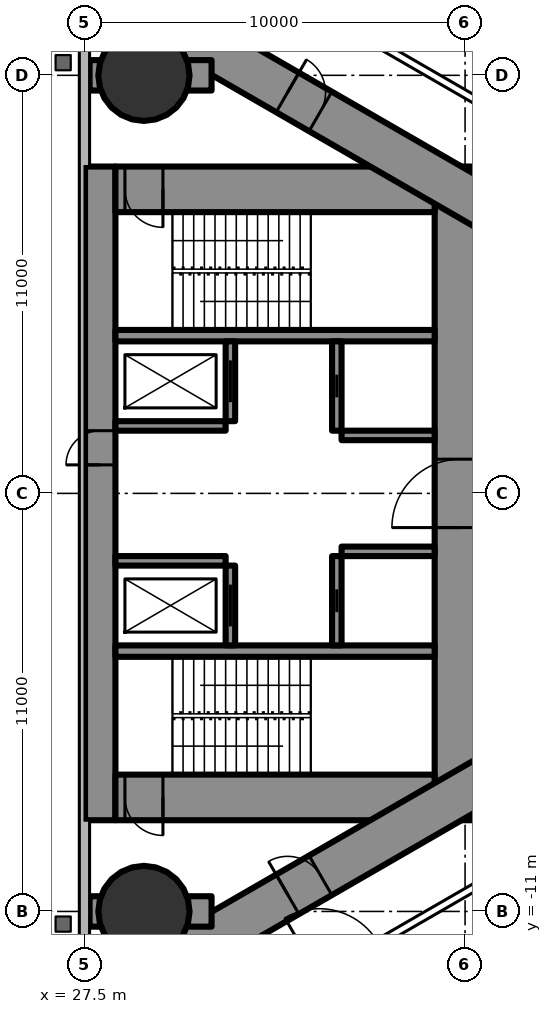
"""IFC4 building model, lengths in metres.
Left out: names, types, materials, properties, quantities, classifications, styles, units other than length and angle.
Written with IfcOpenShell. Run it as: python <this file> out.ifc"""

import sys

from ifc_helpers import new_model, si_unit, direction, frame, frame_2d, origin, origin_2d, place, context, subcontext, project, spatial, rectangle, hollow_circle, extrude, element, fill, save


model = new_model("IFC4")
c1 = context("Model", 3, precision=1e-05, world=origin(), true_north=direction((0.0, 1.0)))
c2 = subcontext(c1, "Body", "Model", "MODEL_VIEW")
j1 = project(units=[si_unit("LENGTHUNIT", "METRE"), si_unit("PLANEANGLEUNIT", "RADIAN")], contexts=[c1])
p1 = place(None, origin())
s1 = spatial("IfcSite", under=j1, at=p1, CompositionType="ELEMENT")
p2 = place(p1, origin())
s2 = spatial("IfcBuilding", under=s1, at=p2, CompositionType="ELEMENT")
p3 = place(p2, frame((0.0, 0.0, 205.3)))
s3 = spatial("IfcBuildingStorey", under=s2, at=p3, CompositionType="ELEMENT", Elevation=205.3)
for number, where, z_axis, x_axis in (
    (1, (29.05, 11.0, 0.0), (0.0, 0.0, 1.0), (1.0, 0.0, 0.0)),
    (2, (29.05, -11.0, 0.0), (0.0, 0.0, 1.0), (1.0, 0.0, 0.0)),
):
    element("IfcColumn", number, at=place(p3, frame(where, z_axis=z_axis, x_axis=x_axis)), inside=s3, PredefinedType="COLUMN", context=c2, shape_type="SweptSolid", body=[
        extrude(hollow_circle(Radius=1.2, WallThickness=0.09, at=origin_2d()), origin(), (0.0, 0.0, 1.0), 5.0),
    ])
p4 = place(p3, frame((27.9, -8.6, 0.0), z_axis=(0.0, 0.0, 1.0), x_axis=(0.0, 1.0, 0.0)))
e3 = element("IfcWall", 3, at=p4, inside=s3, PredefinedType="SHEAR", context=c2, shape_type="SweptSolid", body=[
    extrude(rectangle(XDim=17.2, YDim=0.8, at=frame_2d((8.6, 0.0))), origin(), (0.0, 0.0, 1.0), 5.0),
])
p5 = place(p4, frame((9.35, 0.0, 0.0)))
e4 = element("IfcOpeningElement", 4, at=p5, cuts=e3, PredefinedType="OPENING", context=c2, shape_type="SweptSolid", body=[
    extrude(rectangle(XDim=0.9, YDim=2.2, at=frame_2d((0.45, 1.1))), frame((0.0, 0.41, 0.0), z_axis=(0.0, -1.0, 0.0), x_axis=(1.0, 0.0, 0.0)), (0.0, 0.0, 1.0), 0.82),
])
p6 = place(p3, frame((37.375, -8.6, 0.0), z_axis=(0.0, 0.0, 1.0), x_axis=(0.0, 1.0, 0.0)))
e5 = element("IfcWall", 5, at=p6, inside=s3, PredefinedType="SHEAR", context=c2, shape_type="SweptSolid", body=[
    extrude(rectangle(XDim=17.2, YDim=1.35, at=frame_2d((8.6, 0.0))), origin(), (0.0, 0.0, 1.0), 5.0),
])
p7 = place(p6, frame((7.7, 0.0, 0.0)))
e6 = element("IfcOpeningElement", 6, at=p7, cuts=e5, PredefinedType="OPENING", context=c2, shape_type="SweptSolid", body=[
    extrude(rectangle(XDim=1.8, YDim=2.2, at=frame_2d((0.9, 1.1))), frame((0.0, 0.685, 0.0), z_axis=(0.0, -1.0, 0.0), x_axis=(1.0, 0.0, 0.0)), (0.0, 0.0, 1.0), 1.37),
])
p8 = place(p3, frame((28.3, -8.0, 0.0), z_axis=(0.0, 0.0, 1.0), x_axis=(1.0, 0.0, 0.0)))
e7 = element("IfcWall", 7, at=p8, inside=s3, PredefinedType="SHEAR", context=c2, shape_type="SweptSolid", body=[
    extrude(rectangle(XDim=8.4, YDim=1.2, at=frame_2d((4.2, 0.0))), origin(), (0.0, 0.0, 1.0), 5.0),
])
p9 = place(p8, frame((0.25, 0.0, 0.0)))
e8 = element("IfcOpeningElement", 8, at=p9, cuts=e7, PredefinedType="OPENING", context=c2, shape_type="SweptSolid", body=[
    extrude(rectangle(XDim=1.0, YDim=2.2, at=frame_2d((0.5, 1.1))), frame((0.0, 0.61, 0.0), z_axis=(0.0, -1.0, 0.0), x_axis=(1.0, 0.0, 0.0)), (0.0, 0.0, 1.0), 1.22),
])
p10 = place(p3, frame((28.3, 8.0, 0.0), z_axis=(0.0, 0.0, 1.0), x_axis=(1.0, 0.0, 0.0)))
e9 = element("IfcWall", 9, at=p10, inside=s3, PredefinedType="SHEAR", context=c2, shape_type="SweptSolid", body=[
    extrude(rectangle(XDim=8.4, YDim=1.2, at=frame_2d((4.2, 0.0))), origin(), (0.0, 0.0, 1.0), 5.0),
])
p11 = place(p10, frame((0.25, 0.0, 0.0)))
e10 = element("IfcOpeningElement", 10, at=p11, cuts=e9, PredefinedType="OPENING", context=c2, shape_type="SweptSolid", body=[
    extrude(rectangle(XDim=1.0, YDim=2.2, at=frame_2d((0.5, 1.1))), frame((0.0, 0.61, 0.0), z_axis=(0.0, -1.0, 0.0), x_axis=(1.0, 0.0, 0.0)), (0.0, 0.0, 1.0), 1.22),
])
for number, where, z_axis, x_axis in (
    (11, (28.3, -4.15, 0.0), (0.0, 0.0, 1.0), (1.0, 0.0, 0.0)),
    (12, (28.3, 4.15, 0.0), (0.0, 0.0, 1.0), (1.0, 0.0, 0.0)),
):
    element("IfcWall", number, at=place(p3, frame(where, z_axis=z_axis, x_axis=x_axis)), inside=s3, PredefinedType="SHEAR", context=c2, shape_type="SweptSolid", body=[
        extrude(rectangle(XDim=8.4, YDim=0.3, at=frame_2d((4.2, 0.0))), origin(), (0.0, 0.0, 1.0), 5.0),
    ])
p12 = place(p3, frame((31.325, -4.0, 0.0), z_axis=(0.0, 0.0, 1.0), x_axis=(0.0, 1.0, 0.0)))
e13 = element("IfcWall", 13, at=p12, inside=s3, PredefinedType="SHEAR", context=c2, shape_type="SweptSolid", body=[
    extrude(rectangle(XDim=2.1, YDim=0.25, at=frame_2d((1.05, 0.0))), origin(), (0.0, 0.0, 1.0), 5.0),
])
p13 = place(p12, frame((0.5, 0.0, 0.0)))
e14 = element("IfcOpeningElement", 14, at=p13, cuts=e13, PredefinedType="OPENING", context=c2, shape_type="SweptSolid", body=[
    extrude(rectangle(XDim=1.1, YDim=2.2, at=frame_2d((0.55, 1.1))), frame((0.0, 0.135, 0.0), z_axis=(0.0, -1.0, 0.0), x_axis=(1.0, 0.0, 0.0)), (0.0, 0.0, 1.0), 0.27),
])
p14 = place(p3, frame((34.125, -4.0, 0.0), z_axis=(0.0, 0.0, 1.0), x_axis=(0.0, 1.0, 0.0)))
e15 = element("IfcWall", 15, at=p14, inside=s3, PredefinedType="SHEAR", context=c2, shape_type="SweptSolid", body=[
    extrude(rectangle(XDim=2.35, YDim=0.25, at=frame_2d((1.175, 0.0))), origin(), (0.0, 0.0, 1.0), 5.0),
])
p15 = place(p14, frame((0.875, 0.0, 0.0)))
e16 = element("IfcOpeningElement", 16, at=p15, cuts=e15, PredefinedType="OPENING", context=c2, shape_type="SweptSolid", body=[
    extrude(rectangle(XDim=0.6, YDim=2.0, at=frame_2d((0.3, 1.0))), frame((0.0, 0.135, 0.0), z_axis=(0.0, -1.0, 0.0), x_axis=(1.0, 0.0, 0.0)), (0.0, 0.0, 1.0), 0.27),
])
p16 = place(p3, frame((28.3, -1.775, 0.0), z_axis=(0.0, 0.0, 1.0), x_axis=(1.0, 0.0, 0.0)))
e17 = element("IfcWall", 17, at=p16, inside=s3, PredefinedType="SHEAR", context=c2, shape_type="SweptSolid", body=[
    extrude(rectangle(XDim=2.9, YDim=0.25, at=frame_2d((1.45, 0.0))), origin(), (0.0, 0.0, 1.0), 5.0),
])
p17 = place(p3, frame((34.25, -1.525, 0.0), z_axis=(0.0, 0.0, 1.0), x_axis=(1.0, 0.0, 0.0)))
e18 = element("IfcWall", 18, at=p17, inside=s3, PredefinedType="SHEAR", context=c2, shape_type="SweptSolid", body=[
    extrude(rectangle(XDim=2.45, YDim=0.25, at=frame_2d((1.225, 0.0))), origin(), (0.0, 0.0, 1.0), 5.0),
])
p18 = place(p3, frame((31.325, 1.9, 0.0), z_axis=(0.0, 0.0, 1.0), x_axis=(0.0, 1.0, 0.0)))
e19 = element("IfcWall", 19, at=p18, inside=s3, PredefinedType="SHEAR", context=c2, shape_type="SweptSolid", body=[
    extrude(rectangle(XDim=2.1, YDim=0.25, at=frame_2d((1.05, 0.0))), origin(), (0.0, 0.0, 1.0), 5.0),
])
p19 = place(p18, frame((0.5, 0.0, 0.0)))
e20 = element("IfcOpeningElement", 20, at=p19, cuts=e19, PredefinedType="OPENING", context=c2, shape_type="SweptSolid", body=[
    extrude(rectangle(XDim=1.1, YDim=2.2, at=frame_2d((0.55, 1.1))), frame((0.0, 0.135, 0.0), z_axis=(0.0, -1.0, 0.0), x_axis=(1.0, 0.0, 0.0)), (0.0, 0.0, 1.0), 0.27),
])
p20 = place(p3, frame((34.125, 1.65, 0.0), z_axis=(0.0, 0.0, 1.0), x_axis=(0.0, 1.0, 0.0)))
e21 = element("IfcWall", 21, at=p20, inside=s3, PredefinedType="SHEAR", context=c2, shape_type="SweptSolid", body=[
    extrude(rectangle(XDim=2.35, YDim=0.25, at=frame_2d((1.175, 0.0))), origin(), (0.0, 0.0, 1.0), 5.0),
])
p21 = place(p20, frame((0.875, 0.0, 0.0)))
e22 = element("IfcOpeningElement", 22, at=p21, cuts=e21, PredefinedType="OPENING", context=c2, shape_type="SweptSolid", body=[
    extrude(rectangle(XDim=0.6, YDim=2.0, at=frame_2d((0.3, 1.0))), frame((0.0, 0.135, 0.0), z_axis=(0.0, -1.0, 0.0), x_axis=(1.0, 0.0, 0.0)), (0.0, 0.0, 1.0), 0.27),
])
p22 = place(p3, frame((28.3, 1.775, 0.0), z_axis=(0.0, 0.0, 1.0), x_axis=(1.0, 0.0, 0.0)))
e23 = element("IfcWall", 23, at=p22, inside=s3, PredefinedType="SHEAR", context=c2, shape_type="SweptSolid", body=[
    extrude(rectangle(XDim=2.9, YDim=0.25, at=frame_2d((1.45, 0.0))), origin(), (0.0, 0.0, 1.0), 5.0),
])
p23 = place(p3, frame((34.25, 1.525, 0.0), z_axis=(0.0, 0.0, 1.0), x_axis=(1.0, 0.0, 0.0)))
e24 = element("IfcWall", 24, at=p23, inside=s3, PredefinedType="SHEAR", context=c2, shape_type="SweptSolid", body=[
    extrude(rectangle(XDim=2.45, YDim=0.25, at=frame_2d((1.225, 0.0))), origin(), (0.0, 0.0, 1.0), 5.0),
])
p24 = place(p3, frame((27.2, -13.8, 0.0), z_axis=(0.0, 0.0, 1.0), x_axis=(0.866027159892, 0.499996958321, 0.0)))
e25 = element("IfcWall", 25, at=p24, inside=s3, PredefinedType="SHEAR", context=c2, shape_type="SweptSolid", body=[
    extrude(rectangle(XDim=27.947, YDim=1.2, at=frame_2d((13.973, 0.0))), origin(), (0.0, 0.0, 1.0), 5.0),
])
p25 = place(p24, frame((6.5, 0.0, 0.0)))
e26 = element("IfcOpeningElement", 26, at=p25, cuts=e25, PredefinedType="OPENING", context=c2, shape_type="SweptSolid", body=[
    extrude(rectangle(XDim=1.0, YDim=2.2, at=frame_2d((0.5, 1.1))), frame((0.0, 0.61, 0.0), z_axis=(0.0, -1.0, 0.0), x_axis=(1.0, 0.0, 0.0)), (0.0, 0.0, 1.0), 1.22),
])
p26 = place(p24, frame((13.568, 0.0, 0.0)))
e27 = element("IfcOpeningElement", 27, at=p26, cuts=e25, PredefinedType="OPENING", context=c2, shape_type="SweptSolid", body=[
    extrude(rectangle(XDim=1.8, YDim=2.2, at=frame_2d((0.9, 1.1))), frame((0.0, 0.61, 0.0), z_axis=(0.0, -1.0, 0.0), x_axis=(1.0, 0.0, 0.0)), (0.0, 0.0, 1.0), 1.22),
])
p27 = place(p3, frame((27.2, 13.8, 0.0), z_axis=(0.0, 0.0, 1.0), x_axis=(0.866024515034, -0.500001539357, 0.0)))
e28 = element("IfcWall", 28, at=p27, inside=s3, PredefinedType="SHEAR", context=c2, shape_type="SweptSolid", body=[
    extrude(rectangle(XDim=26.907, YDim=1.2, at=frame_2d((13.454, 0.0))), origin(), (0.0, 0.0, 1.0), 5.0),
])
p28 = place(p27, frame((6.5, 0.0, 0.0)))
e29 = element("IfcOpeningElement", 29, at=p28, cuts=e28, PredefinedType="OPENING", context=c2, shape_type="SweptSolid", body=[
    extrude(rectangle(XDim=1.0, YDim=2.2, at=frame_2d((0.5, 1.1))), frame((0.0, 0.61, 0.0), z_axis=(0.0, -1.0, 0.0), x_axis=(1.0, 0.0, 0.0)), (0.0, 0.0, 1.0), 1.22),
])
p29 = place(p27, frame((13.568, 0.0, 0.0)))
e30 = element("IfcOpeningElement", 30, at=p29, cuts=e28, PredefinedType="OPENING", context=c2, shape_type="SweptSolid", body=[
    extrude(rectangle(XDim=1.8, YDim=2.2, at=frame_2d((0.9, 1.1))), frame((0.0, 0.61, 0.0), z_axis=(0.0, -1.0, 0.0), x_axis=(1.0, 0.0, 0.0)), (0.0, 0.0, 1.0), 1.22),
])
for number, where, z_axis, x_axis in (
    (31, (27.62, -11.0, 0.0), (0.0, 0.0, 1.0), (1.0, 0.0, 0.0)),
    (32, (27.62, 11.0, 0.0), (0.0, 0.0, 1.0), (1.0, 0.0, 0.0)),
):
    element("IfcWall", number, at=place(p3, frame(where, z_axis=z_axis, x_axis=x_axis)), inside=s3, PredefinedType="SHEAR", context=c2, shape_type="SweptSolid", body=[
        extrude(rectangle(XDim=3.209, YDim=0.8, at=frame_2d((1.605, 0.0))), origin(), (0.0, 0.0, 1.0), 5.0),
    ])
p30 = place(p3, frame((27.959, 16.017, 0.0), z_axis=(0.0, 0.0, 1.0), x_axis=(0.866027146794, -0.499996981007, 0.0)))
e33 = element("IfcWall", 33, at=p30, inside=s3, PredefinedType="PARTITIONING", context=c2, shape_type="SweptSolid", body=[
    extrude(rectangle(XDim=21.657, YDim=0.2, at=frame_2d((10.829, 0.0))), origin(), (0.0, 0.0, 1.0), 4.75),
])
p31 = place(p30, frame((15.57, 0.0, 0.0)))
e34 = element("IfcOpeningElement", 34, at=p31, cuts=e33, PredefinedType="OPENING", context=c2, shape_type="SweptSolid", body=[
    extrude(rectangle(XDim=1.8, YDim=2.2, at=frame_2d((0.9, 1.1))), frame((0.0, 0.11, 0.0), z_axis=(0.0, -1.0, 0.0), x_axis=(1.0, 0.0, 0.0)), (0.0, 0.0, 1.0), 0.22),
])
p32 = place(p30, frame((6.579, 0.0, 0.0)))
e35 = element("IfcOpeningElement", 35, at=p32, cuts=e33, PredefinedType="OPENING", context=c2, shape_type="SweptSolid", body=[
    extrude(rectangle(XDim=1.8, YDim=2.2, at=frame_2d((0.9, 1.1))), frame((0.0, 0.11, 0.0), z_axis=(0.0, -1.0, 0.0), x_axis=(1.0, 0.0, 0.0)), (0.0, 0.0, 1.0), 0.22),
])
p33 = place(p3, frame((27.959, -16.017, 0.0), z_axis=(0.0, 0.0, 1.0), x_axis=(0.866026253963, 0.499998527445, 0.0)))
e36 = element("IfcWall", 36, at=p33, inside=s3, PredefinedType="PARTITIONING", context=c2, shape_type="SweptSolid", body=[
    extrude(rectangle(XDim=24.241, YDim=0.2, at=frame_2d((12.12, 0.0))), origin(), (0.0, 0.0, 1.0), 4.75),
])
p34 = place(p33, frame((6.579, 0.0, 0.0)))
e37 = element("IfcOpeningElement", 37, at=p34, cuts=e36, PredefinedType="OPENING", context=c2, shape_type="SweptSolid", body=[
    extrude(rectangle(XDim=1.8, YDim=2.2, at=frame_2d((0.9, 1.1))), frame((0.0, 0.11, 0.0), z_axis=(0.0, -1.0, 0.0), x_axis=(1.0, 0.0, 0.0)), (0.0, 0.0, 1.0), 0.22),
])
p35 = place(p33, frame((17.612, 0.0, 0.0)))
e38 = element("IfcOpeningElement", 38, at=p35, cuts=e36, PredefinedType="OPENING", context=c2, shape_type="SweptSolid", body=[
    extrude(rectangle(XDim=2.0, YDim=2.4, at=frame_2d((1.0, 1.2))), frame((0.0, 0.11, 0.0), z_axis=(0.0, -1.0, 0.0), x_axis=(1.0, 0.0, 0.0)), (0.0, 0.0, 1.0), 0.22),
])
p36 = place(p25, origin())
e39 = element("IfcDoor", 39, at=p36, inside=s3, OperationType="SINGLE_SWING_LEFT", PredefinedType="DOOR", context=c2, shape_type="SweptSolid", body=[
    extrude(rectangle(XDim=1.0, YDim=2.2, at=frame_2d((0.5, 1.1))), frame((0.0, 0.025, 0.0), z_axis=(0.0, -1.0, 0.0), x_axis=(1.0, 0.0, 0.0)), (0.0, 0.0, 1.0), 0.05),
])
fill(e26, e39)
p37 = place(p28, origin())
e40 = element("IfcDoor", 40, at=p37, inside=s3, OperationType="SINGLE_SWING_LEFT", PredefinedType="DOOR", context=c2, shape_type="SweptSolid", body=[
    extrude(rectangle(XDim=1.0, YDim=2.2, at=frame_2d((0.5, 1.1))), frame((0.0, 0.025, 0.0), z_axis=(0.0, -1.0, 0.0), x_axis=(1.0, 0.0, 0.0)), (0.0, 0.0, 1.0), 0.05),
])
fill(e29, e40)
p38 = place(p7, origin())
e41 = element("IfcDoor", 41, at=p38, inside=s3, OperationType="DOUBLE_DOOR_SINGLE_SWING", PredefinedType="DOOR", context=c2, shape_type="SweptSolid", body=[
    extrude(rectangle(XDim=1.8, YDim=2.2, at=frame_2d((0.9, 1.1))), frame((0.0, 0.025, 0.0), z_axis=(0.0, -1.0, 0.0), x_axis=(1.0, 0.0, 0.0)), (0.0, 0.0, 1.0), 0.05),
])
fill(e6, e41)
p39 = place(p9, origin())
e42 = element("IfcDoor", 42, at=p39, inside=s3, OperationType="SINGLE_SWING_RIGHT", PredefinedType="DOOR", context=c2, shape_type="SweptSolid", body=[
    extrude(rectangle(XDim=1.0, YDim=2.2, at=frame_2d((0.5, 1.1))), frame((0.0, 0.025, 0.0), z_axis=(0.0, -1.0, 0.0), x_axis=(1.0, 0.0, 0.0)), (0.0, 0.0, 1.0), 0.05),
])
fill(e8, e42)
p40 = place(p11, origin())
e43 = element("IfcDoor", 43, at=p40, inside=s3, OperationType="SINGLE_SWING_RIGHT", PredefinedType="DOOR", context=c2, shape_type="SweptSolid", body=[
    extrude(rectangle(XDim=1.0, YDim=2.2, at=frame_2d((0.5, 1.1))), frame((0.0, 0.025, 0.0), z_axis=(0.0, -1.0, 0.0), x_axis=(1.0, 0.0, 0.0)), (0.0, 0.0, 1.0), 0.05),
])
fill(e10, e43)
p41 = place(p5, origin())
e44 = element("IfcDoor", 44, at=p41, inside=s3, OperationType="SINGLE_SWING_LEFT", PredefinedType="DOOR", context=c2, shape_type="SweptSolid", body=[
    extrude(rectangle(XDim=0.9, YDim=2.2, at=frame_2d((0.45, 1.1))), frame((0.0, 0.025, 0.0), z_axis=(0.0, -1.0, 0.0), x_axis=(1.0, 0.0, 0.0)), (0.0, 0.0, 1.0), 0.05),
])
fill(e4, e44)
p42 = place(p13, origin())
e45 = element("IfcDoor", 45, at=p42, inside=s3, OperationType="SLIDING_TO_LEFT", PredefinedType="USERDEFINED", context=c2, shape_type="SweptSolid", body=[
    extrude(rectangle(XDim=1.1, YDim=2.2, at=frame_2d((0.55, 1.1))), frame((0.0, 0.025, 0.0), z_axis=(0.0, -1.0, 0.0), x_axis=(1.0, 0.0, 0.0)), (0.0, 0.0, 1.0), 0.05),
])
fill(e14, e45)
p43 = place(p19, origin())
e46 = element("IfcDoor", 46, at=p43, inside=s3, OperationType="SLIDING_TO_LEFT", PredefinedType="USERDEFINED", context=c2, shape_type="SweptSolid", body=[
    extrude(rectangle(XDim=1.1, YDim=2.2, at=frame_2d((0.55, 1.1))), frame((0.0, 0.025, 0.0), z_axis=(0.0, -1.0, 0.0), x_axis=(1.0, 0.0, 0.0)), (0.0, 0.0, 1.0), 0.05),
])
fill(e20, e46)
p44 = place(p15, origin())
e47 = element("IfcDoor", 47, at=p44, inside=s3, OperationType="SLIDING_TO_LEFT", PredefinedType="DOOR", context=c2, shape_type="SweptSolid", body=[
    extrude(rectangle(XDim=0.6, YDim=2.0, at=frame_2d((0.3, 1.0))), frame((0.0, 0.025, 0.0), z_axis=(0.0, -1.0, 0.0), x_axis=(1.0, 0.0, 0.0)), (0.0, 0.0, 1.0), 0.05),
])
fill(e16, e47)
p45 = place(p21, origin())
e48 = element("IfcDoor", 48, at=p45, inside=s3, OperationType="SLIDING_TO_LEFT", PredefinedType="DOOR", context=c2, shape_type="SweptSolid", body=[
    extrude(rectangle(XDim=0.6, YDim=2.0, at=frame_2d((0.3, 1.0))), frame((0.0, 0.025, 0.0), z_axis=(0.0, -1.0, 0.0), x_axis=(1.0, 0.0, 0.0)), (0.0, 0.0, 1.0), 0.05),
])
fill(e22, e48)
save(model, sys.argv[1])
